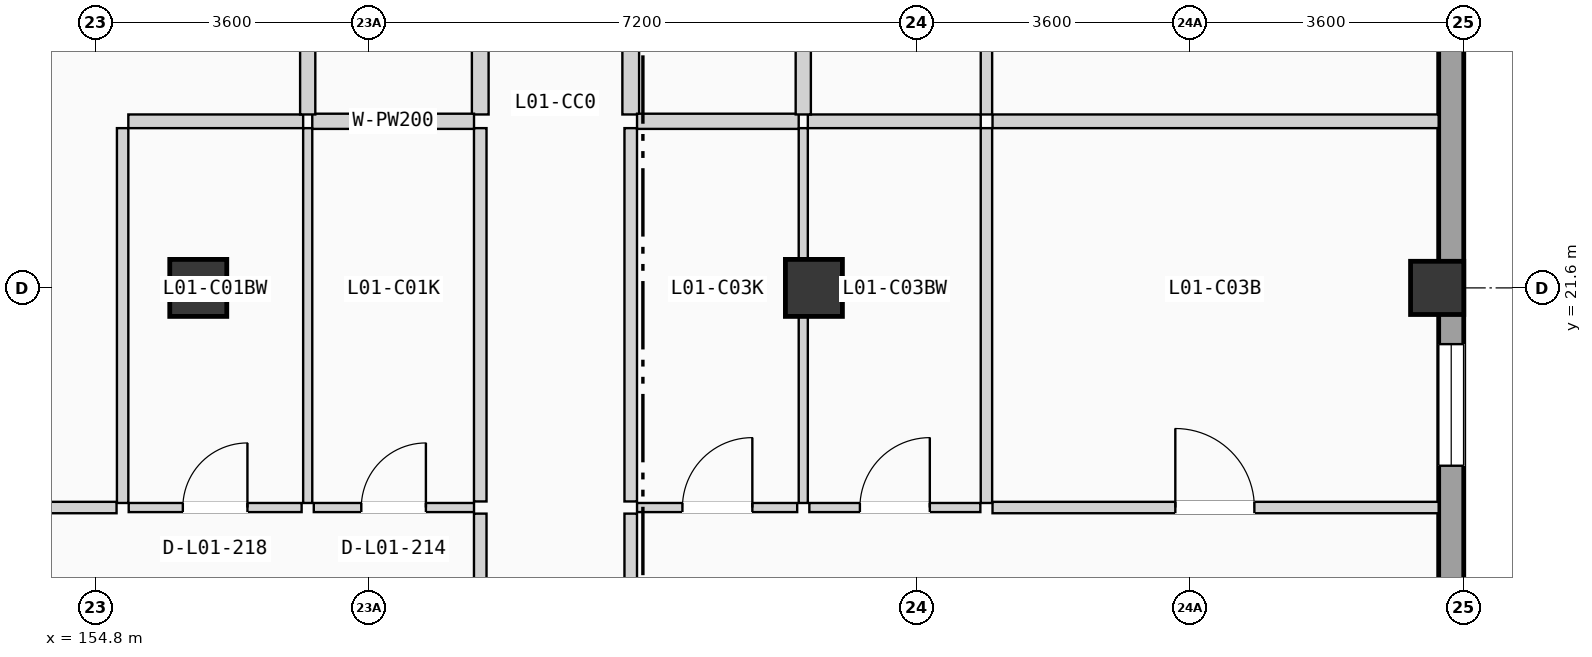
"""IFC4 building model, lengths in metres.
Left out: names, types, materials, properties, quantities, classifications, styles, units other than length and angle.
Written with IfcOpenShell. Run it as: python <this file> out.ifc"""

import sys

from ifc_helpers import new_model, si_unit, direction, frame, frame_2d, origin, origin_2d, place, context, subcontext, project, spatial, rectangle, extrude, element, fill, save


model = new_model("IFC4")
c1 = context("Model", 3, precision=1e-05, world=origin(), true_north=direction((0.0, 1.0)))
c2 = subcontext(c1, "Body", "Model", "MODEL_VIEW")
j1 = project(units=[si_unit("LENGTHUNIT", "METRE"), si_unit("PLANEANGLEUNIT", "RADIAN")], contexts=[c1])
p1 = place(None, origin())
s1 = spatial("IfcSite", under=j1, at=p1, CompositionType="ELEMENT")
p2 = place(p1, origin())
s2 = spatial("IfcBuilding", under=s1, at=p2, CompositionType="ELEMENT")
p3 = place(p2, frame((0.0, 0.0, 4.9)))
s3 = spatial("IfcBuildingStorey", under=s2, at=p3, CompositionType="ELEMENT", Elevation=4.9)
for number, where, z_axis, x_axis in (
    (1, (156.15, 21.6, 0.0), (0.0, 0.0, 1.0), (1.0, 0.0, 0.0)),
    (2, (164.25, 21.6, 0.0), (0.0, 0.0, 1.0), (1.0, 0.0, 0.0)),
):
    element("IfcColumn", number, at=place(p3, frame(where, z_axis=z_axis, x_axis=x_axis)), inside=s3, PredefinedType="COLUMN", context=c2, shape_type="SweptSolid", body=[
        extrude(rectangle(XDim=0.75, YDim=0.75, at=origin_2d()), origin(), (0.0, 0.0, 1.0), 3.675),
    ])
p4 = place(p3, frame((172.45, 21.6, 0.0), z_axis=(0.0, 0.0, 1.0), x_axis=(1.0, 0.0, 0.0)))
e3 = element("IfcColumn", 3, at=p4, inside=s3, PredefinedType="COLUMN", context=c2, shape_type="SweptSolid", body=[
    extrude(rectangle(XDim=0.7, YDim=0.7, at=origin_2d()), origin(), (0.0, 0.0, 1.0), 3.675),
])
p5 = place(p3, frame((172.635, 0.33, 0.0), z_axis=(0.0, 0.0, 1.0), x_axis=(0.0, 1.0, 0.0)))
e4 = element("IfcWall", 4, at=p5, inside=s3, PredefinedType="SOLIDWALL", context=c2, shape_type="SweptSolid", body=[
    extrude(rectangle(XDim=49.74, YDim=0.33, at=frame_2d((24.87, 0.0))), origin(), (0.0, 0.0, 1.0), 3.415),
])
p6 = place(p5, frame((15.58, 0.0, 0.9)))
e5 = element("IfcOpeningElement", 5, at=p6, cuts=e4, PredefinedType="OPENING", context=c2, shape_type="SweptSolid", body=[
    extrude(rectangle(XDim=1.48, YDim=1.65, at=frame_2d((0.74, 0.825))), frame((0.0, 0.175, 0.0), z_axis=(0.0, -1.0, 0.0), x_axis=(1.0, 0.0, 0.0)), (0.0, 0.0, 1.0), 0.35),
])
p7 = place(p5, frame((8.986, 0.0, 0.9)))
e6 = element("IfcOpeningElement", 6, at=p7, cuts=e4, PredefinedType="OPENING", context=c2, shape_type="SweptSolid", body=[
    extrude(rectangle(XDim=1.48, YDim=1.8, at=frame_2d((0.74, 0.9))), frame((0.0, 0.175, 0.0), z_axis=(0.0, -1.0, 0.0), x_axis=(1.0, 0.0, 0.0)), (0.0, 0.0, 1.0), 0.35),
])
p8 = place(p5, frame((18.93, 0.0, 0.9)))
e7 = element("IfcOpeningElement", 7, at=p8, cuts=e4, PredefinedType="OPENING", context=c2, shape_type="SweptSolid", body=[
    extrude(rectangle(XDim=1.6, YDim=1.2, at=frame_2d((0.8, 0.6))), frame((0.0, 0.175, 0.0), z_axis=(0.0, -1.0, 0.0), x_axis=(1.0, 0.0, 0.0)), (0.0, 0.0, 1.0), 0.35),
])
p9 = place(p5, frame((31.648, 0.0, 0.9)))
e8 = element("IfcOpeningElement", 8, at=p9, cuts=e4, PredefinedType="OPENING", context=c2, shape_type="SweptSolid", body=[
    extrude(rectangle(XDim=1.6, YDim=1.35, at=frame_2d((0.8, 0.675))), frame((0.0, 0.175, 0.0), z_axis=(0.0, -1.0, 0.0), x_axis=(1.0, 0.0, 0.0)), (0.0, 0.0, 1.0), 0.35),
])
p10 = place(p5, frame((25.076, 0.0, 0.9)))
e9 = element("IfcOpeningElement", 9, at=p10, cuts=e4, PredefinedType="OPENING", context=c2, shape_type="SweptSolid", body=[
    extrude(rectangle(XDim=1.6, YDim=1.5, at=frame_2d((0.8, 0.75))), frame((0.0, 0.175, 0.0), z_axis=(0.0, -1.0, 0.0), x_axis=(1.0, 0.0, 0.0)), (0.0, 0.0, 1.0), 0.35),
])
p11 = place(p5, frame((38.778, 0.0, 0.9)))
e10 = element("IfcOpeningElement", 10, at=p11, cuts=e4, PredefinedType="OPENING", context=c2, shape_type="SweptSolid", body=[
    extrude(rectangle(XDim=1.6, YDim=1.65, at=frame_2d((0.8, 0.825))), frame((0.0, 0.175, 0.0), z_axis=(0.0, -1.0, 0.0), x_axis=(1.0, 0.0, 0.0)), (0.0, 0.0, 1.0), 0.35),
])
p12 = place(p3, frame((159.86, 12.672, 0.0), z_axis=(0.0, 0.0, 1.0), x_axis=(0.0, 1.0, 0.0)))
e11 = element("IfcWall", 11, at=p12, inside=s3, PredefinedType="PARTITIONING", context=c2, shape_type="SweptSolid", body=[
    extrude(rectangle(XDim=5.958, YDim=0.165, at=frame_2d((2.979, 0.0))), origin(), (0.0, 0.0, 1.0), 3.395),
])
p13 = place(p12, frame((2.454, 0.0, 0.0)))
e12 = element("IfcOpeningElement", 12, at=p13, cuts=e11, PredefinedType="OPENING", context=c2, shape_type="SweptSolid", body=[
    extrude(rectangle(XDim=1.05, YDim=2.13, at=frame_2d((0.525, 1.065))), frame((0.0, 0.093, 0.0), z_axis=(0.0, -1.0, 0.0), x_axis=(1.0, 0.0, 0.0)), (0.0, 0.0, 1.0), 0.185),
])
p14 = place(p3, frame((159.86, 18.79, 0.0), z_axis=(0.0, 0.0, 1.0), x_axis=(0.0, 1.0, 0.0)))
e13 = element("IfcWall", 13, at=p14, inside=s3, PredefinedType="PARTITIONING", context=c2, shape_type="SweptSolid", body=[
    extrude(rectangle(XDim=4.912, YDim=0.165, at=frame_2d((2.456, 0.0))), origin(), (0.0, 0.0, 1.0), 3.395),
])
p15 = place(p3, frame((159.86, 23.882, 0.0), z_axis=(0.0, 0.0, 1.0), x_axis=(0.0, 1.0, 0.0)))
e14 = element("IfcWall", 14, at=p15, inside=s3, PredefinedType="PLUMBINGWALL", context=c2, shape_type="SweptSolid", body=[
    extrude(rectangle(XDim=5.83, YDim=0.22, at=frame_2d((2.915, 0.0))), origin(), (0.0, 0.0, 1.0), 3.395),
])
p16 = place(p3, frame((161.84, 12.672, 0.0), z_axis=(0.0, 0.0, 1.0), x_axis=(0.0, 1.0, 0.0)))
e15 = element("IfcWall", 15, at=p16, inside=s3, PredefinedType="PARTITIONING", context=c2, shape_type="SweptSolid", body=[
    extrude(rectangle(XDim=5.958, YDim=0.165, at=frame_2d((2.979, 0.0))), origin(), (0.0, 0.0, 1.0), 3.395),
])
p17 = place(p16, frame((2.454, 0.0, 0.0)))
e16 = element("IfcOpeningElement", 16, at=p17, cuts=e15, PredefinedType="OPENING", context=c2, shape_type="SweptSolid", body=[
    extrude(rectangle(XDim=1.05, YDim=2.13, at=frame_2d((0.525, 1.065))), frame((0.0, 0.093, 0.0), z_axis=(0.0, -1.0, 0.0), x_axis=(1.0, 0.0, 0.0)), (0.0, 0.0, 1.0), 0.185),
])
p18 = place(p3, frame((161.84, 18.79, 0.0), z_axis=(0.0, 0.0, 1.0), x_axis=(0.0, 1.0, 0.0)))
e17 = element("IfcWall", 17, at=p18, inside=s3, PredefinedType="PARTITIONING", context=c2, shape_type="SweptSolid", body=[
    extrude(rectangle(XDim=4.912, YDim=0.165, at=frame_2d((2.456, 0.0))), origin(), (0.0, 0.0, 1.0), 3.395),
])
p19 = place(p3, frame((161.84, 23.882, 0.0), z_axis=(0.0, 0.0, 1.0), x_axis=(0.0, 1.0, 0.0)))
e18 = element("IfcWall", 18, at=p19, inside=s3, PredefinedType="PLUMBINGWALL", context=c2, shape_type="SweptSolid", body=[
    extrude(rectangle(XDim=5.785, YDim=0.22, at=frame_2d((2.893, 0.0))), origin(), (0.0, 0.0, 1.0), 3.395),
])
p20 = place(p3, frame((157.67, 18.71, 0.0), z_axis=(0.0, 0.0, 1.0), x_axis=(1.0, 0.0, 0.0)))
e19 = element("IfcWall", 19, at=p20, inside=s3, PredefinedType="PARTITIONING", context=c2, shape_type="SweptSolid", body=[
    extrude(rectangle(XDim=2.108, YDim=0.12, at=frame_2d((1.054, 0.0))), origin(), (0.0, 0.0, 1.0), 3.395),
])
p21 = place(p20, frame((0.625, 0.0, 0.0)))
e20 = element("IfcOpeningElement", 20, at=p21, cuts=e19, PredefinedType="OPENING", context=c2, shape_type="SweptSolid", body=[
    extrude(rectangle(XDim=0.85, YDim=2.01, at=frame_2d((0.425, 1.005))), frame((0.0, 0.07, 0.0), z_axis=(0.0, -1.0, 0.0), x_axis=(1.0, 0.0, 0.0)), (0.0, 0.0, 1.0), 0.14),
])
p22 = place(p3, frame((147.93, 18.71, 0.0), z_axis=(0.0, 0.0, 1.0), x_axis=(1.0, 0.0, 0.0)))
e21 = element("IfcWall", 21, at=p22, inside=s3, PredefinedType="PARTITIONING", context=c2, shape_type="SweptSolid", body=[
    extrude(rectangle(XDim=7.145, YDim=0.15, at=frame_2d((3.573, 0.0))), origin(), (0.0, 0.0, 1.0), 3.395),
])
p23 = place(p22, frame((3.132, 0.0, 0.0)))
e22 = element("IfcOpeningElement", 22, at=p23, cuts=e21, PredefinedType="OPENING", context=c2, shape_type="SweptSolid", body=[
    extrude(rectangle(XDim=0.9, YDim=2.04, at=frame_2d((0.45, 1.02))), frame((0.0, 0.085, 0.0), z_axis=(0.0, -1.0, 0.0), x_axis=(1.0, 0.0, 0.0)), (0.0, 0.0, 1.0), 0.17),
])
p24 = place(p3, frame((155.235, 18.71, 0.0), z_axis=(0.0, 0.0, 1.0), x_axis=(1.0, 0.0, 0.0)))
e23 = element("IfcWall", 23, at=p24, inside=s3, PredefinedType="PARTITIONING", context=c2, shape_type="SweptSolid", body=[
    extrude(rectangle(XDim=2.275, YDim=0.12, at=frame_2d((1.137, 0.0))), origin(), (0.0, 0.0, 1.0), 3.395),
])
p25 = place(p24, frame((0.712, 0.0, 0.0)))
e24 = element("IfcOpeningElement", 24, at=p25, cuts=e23, PredefinedType="OPENING", context=c2, shape_type="SweptSolid", body=[
    extrude(rectangle(XDim=0.85, YDim=2.01, at=frame_2d((0.425, 1.005))), frame((0.0, 0.07, 0.0), z_axis=(0.0, -1.0, 0.0), x_axis=(1.0, 0.0, 0.0)), (0.0, 0.0, 1.0), 0.14),
])
p26 = place(p3, frame((157.59, 18.77, 0.0), z_axis=(0.0, 0.0, 1.0), x_axis=(0.0, 1.0, 0.0)))
e25 = element("IfcWall", 25, at=p26, inside=s3, PredefinedType="PARTITIONING", context=c2, shape_type="SweptSolid", body=[
    extrude(rectangle(XDim=4.932, YDim=0.12, at=frame_2d((2.466, 0.0))), origin(), (0.0, 0.0, 1.0), 3.395),
])
p27 = place(p3, frame((157.65, 23.792, 0.0), z_axis=(0.0, 0.0, 1.0), x_axis=(1.0, 0.0, 0.0)))
e26 = element("IfcWall", 26, at=p27, inside=s3, PredefinedType="PLUMBINGWALL", context=c2, shape_type="SweptSolid", body=[
    extrude(rectangle(XDim=2.128, YDim=0.2, at=frame_2d((1.064, 0.0))), origin(), (0.0, 0.0, 1.0), 3.395),
])
p28 = place(p3, frame((155.155, 18.77, 0.0), z_axis=(0.0, 0.0, 1.0), x_axis=(0.0, 1.0, 0.0)))
e27 = element("IfcWall", 27, at=p28, inside=s3, PredefinedType="PARTITIONING", context=c2, shape_type="SweptSolid", body=[
    extrude(rectangle(XDim=4.932, YDim=0.15, at=frame_2d((2.466, 0.0))), origin(), (0.0, 0.0, 1.0), 3.395),
])
p29 = place(p3, frame((155.23, 23.792, 0.0), z_axis=(0.0, 0.0, 1.0), x_axis=(1.0, 0.0, 0.0)))
e28 = element("IfcWall", 28, at=p29, inside=s3, PredefinedType="PARTITIONING", context=c2, shape_type="SweptSolid", body=[
    extrude(rectangle(XDim=2.3, YDim=0.18, at=frame_2d((1.15, 0.0))), origin(), (0.0, 0.0, 1.0), 3.395),
])
p30 = place(p3, frame((157.59, 23.882, 0.0), z_axis=(0.0, 0.0, 1.0), x_axis=(0.0, 1.0, 0.0)))
e29 = element("IfcWall", 29, at=p30, inside=s3, PredefinedType="PLUMBINGWALL", context=c2, shape_type="SweptSolid", body=[
    extrude(rectangle(XDim=5.85, YDim=0.2, at=frame_2d((2.925, 0.0))), origin(), (0.0, 0.0, 1.0), 3.395),
])
p31 = place(p30, frame((2.49, 0.0, 0.0)))
e30 = element("IfcOpeningElement", 30, at=p31, cuts=e29, PredefinedType="OPENING", context=c2, shape_type="SweptSolid", body=[
    extrude(rectangle(XDim=0.85, YDim=2.01, at=frame_2d((0.425, 1.005))), frame((0.0, 0.11, 0.0), z_axis=(0.0, -1.0, 0.0), x_axis=(1.0, 0.0, 0.0)), (0.0, 0.0, 1.0), 0.22),
])
p32 = place(p3, frame((161.923, 18.71, 0.0), z_axis=(0.0, 0.0, 1.0), x_axis=(1.0, 0.0, 0.0)))
e31 = element("IfcWall", 31, at=p32, inside=s3, PredefinedType="PARTITIONING", context=c2, shape_type="SweptSolid", body=[
    extrude(rectangle(XDim=2.107, YDim=0.12, at=frame_2d((1.053, 0.0))), origin(), (0.0, 0.0, 1.0), 3.395),
])
p33 = place(p32, frame((0.597, 0.0, 0.0)))
e32 = element("IfcOpeningElement", 32, at=p33, cuts=e31, PredefinedType="OPENING", context=c2, shape_type="SweptSolid", body=[
    extrude(rectangle(XDim=0.92, YDim=2.02, at=frame_2d((0.46, 1.01))), frame((0.0, 0.07, 0.0), z_axis=(0.0, -1.0, 0.0), x_axis=(1.0, 0.0, 0.0)), (0.0, 0.0, 1.0), 0.14),
])
p34 = place(p3, frame((166.6, 18.71, 0.0), z_axis=(0.0, 0.0, 1.0), x_axis=(1.0, 0.0, 0.0)))
e33 = element("IfcWall", 33, at=p34, inside=s3, PredefinedType="PARTITIONING", context=c2, shape_type="SweptSolid", body=[
    extrude(rectangle(XDim=5.87, YDim=0.15, at=frame_2d((2.935, 0.0))), origin(), (0.0, 0.0, 1.0), 3.395),
])
p35 = place(p34, frame((2.405, 0.0, 0.0)))
e34 = element("IfcOpeningElement", 34, at=p35, cuts=e33, PredefinedType="OPENING", context=c2, shape_type="SweptSolid", body=[
    extrude(rectangle(XDim=1.04, YDim=2.08, at=frame_2d((0.52, 1.04))), frame((0.0, 0.085, 0.0), z_axis=(0.0, -1.0, 0.0), x_axis=(1.0, 0.0, 0.0)), (0.0, 0.0, 1.0), 0.17),
])
p36 = place(p3, frame((164.19, 18.71, 0.0), z_axis=(0.0, 0.0, 1.0), x_axis=(1.0, 0.0, 0.0)))
e35 = element("IfcWall", 35, at=p36, inside=s3, PredefinedType="PARTITIONING", context=c2, shape_type="SweptSolid", body=[
    extrude(rectangle(XDim=2.25, YDim=0.12, at=frame_2d((1.125, 0.0))), origin(), (0.0, 0.0, 1.0), 3.395),
])
p37 = place(p36, frame((0.665, 0.0, 0.0)))
e36 = element("IfcOpeningElement", 36, at=p37, cuts=e35, PredefinedType="OPENING", context=c2, shape_type="SweptSolid", body=[
    extrude(rectangle(XDim=0.92, YDim=2.02, at=frame_2d((0.46, 1.01))), frame((0.0, 0.07, 0.0), z_axis=(0.0, -1.0, 0.0), x_axis=(1.0, 0.0, 0.0)), (0.0, 0.0, 1.0), 0.14),
])
p38 = place(p3, frame((164.11, 18.77, 0.0), z_axis=(0.0, 0.0, 1.0), x_axis=(0.0, 1.0, 0.0)))
e37 = element("IfcWall", 37, at=p38, inside=s3, PredefinedType="PARTITIONING", context=c2, shape_type="SweptSolid", body=[
    extrude(rectangle(XDim=4.932, YDim=0.12, at=frame_2d((2.466, 0.0))), origin(), (0.0, 0.0, 1.0), 3.395),
])
p39 = place(p3, frame((161.923, 23.792, 0.0), z_axis=(0.0, 0.0, 1.0), x_axis=(1.0, 0.0, 0.0)))
e38 = element("IfcWall", 38, at=p39, inside=s3, PredefinedType="PLUMBINGWALL", context=c2, shape_type="SweptSolid", body=[
    extrude(rectangle(XDim=2.127, YDim=0.2, at=frame_2d((1.063, 0.0))), origin(), (0.0, 0.0, 1.0), 3.395),
])
p40 = place(p3, frame((166.52, 18.77, 0.0), z_axis=(0.0, 0.0, 1.0), x_axis=(0.0, 1.0, 0.0)))
e39 = element("IfcWall", 39, at=p40, inside=s3, PredefinedType="PARTITIONING", context=c2, shape_type="SweptSolid", body=[
    extrude(rectangle(XDim=4.932, YDim=0.15, at=frame_2d((2.466, 0.0))), origin(), (0.0, 0.0, 1.0), 3.395),
])
p41 = place(p3, frame((166.6, 23.792, 0.0), z_axis=(0.0, 0.0, 1.0), x_axis=(1.0, 0.0, 0.0)))
e40 = element("IfcWall", 40, at=p41, inside=s3, PredefinedType="PARTITIONING", context=c2, shape_type="SweptSolid", body=[
    extrude(rectangle(XDim=5.87, YDim=0.18, at=frame_2d((2.935, 0.0))), origin(), (0.0, 0.0, 1.0), 3.395),
])
p42 = place(p3, frame((164.17, 23.792, 0.0), z_axis=(0.0, 0.0, 1.0), x_axis=(1.0, 0.0, 0.0)))
e41 = element("IfcWall", 41, at=p42, inside=s3, PredefinedType="PARTITIONING", context=c2, shape_type="SweptSolid", body=[
    extrude(rectangle(XDim=2.275, YDim=0.18, at=frame_2d((1.138, 0.0))), origin(), (0.0, 0.0, 1.0), 3.395),
])
p43 = place(p3, frame((164.11, 23.882, 0.0), z_axis=(0.0, 0.0, 1.0), x_axis=(0.0, 1.0, 0.0)))
e42 = element("IfcWall", 42, at=p43, inside=s3, PredefinedType="PLUMBINGWALL", context=c2, shape_type="SweptSolid", body=[
    extrude(rectangle(XDim=5.805, YDim=0.2, at=frame_2d((2.902, 0.0))), origin(), (0.0, 0.0, 1.0), 3.395),
])
p44 = place(p43, frame((2.468, 0.0, 0.0)))
e43 = element("IfcOpeningElement", 43, at=p44, cuts=e42, PredefinedType="OPENING", context=c2, shape_type="SweptSolid", body=[
    extrude(rectangle(XDim=0.85, YDim=2.01, at=frame_2d((0.425, 1.005))), frame((0.0, 0.11, 0.0), z_axis=(0.0, -1.0, 0.0), x_axis=(1.0, 0.0, 0.0)), (0.0, 0.0, 1.0), 0.22),
])
p45 = place(p3, frame((166.52, 23.882, 0.0), z_axis=(0.0, 0.0, 1.0), x_axis=(0.0, 1.0, 0.0)))
e44 = element("IfcWall", 44, at=p45, inside=s3, PredefinedType="PARTITIONING", context=c2, shape_type="SweptSolid", body=[
    extrude(rectangle(XDim=5.805, YDim=0.15, at=frame_2d((2.902, 0.0))), origin(), (0.0, 0.0, 1.0), 3.395),
])
p46 = place(p8, origin())
e45 = element("IfcWindow", 45, at=p46, inside=s3, PartitioningType="DOUBLE_PANEL_VERTICAL", PredefinedType="WINDOW", context=c2, shape_type="SweptSolid", body=[
    extrude(rectangle(XDim=1.6, YDim=1.2, at=frame_2d((0.8, 0.6))), frame((0.0, 0.03, 0.0), z_axis=(0.0, -1.0, 0.0), x_axis=(1.0, 0.0, 0.0)), (0.0, 0.0, 1.0), 0.06),
])
fill(e7, e45)
p47 = place(p21, origin())
e46 = element("IfcDoor", 46, at=p47, inside=s3, OperationType="SINGLE_SWING_RIGHT", PredefinedType="DOOR", context=c2, shape_type="SweptSolid", body=[
    extrude(rectangle(XDim=0.85, YDim=2.01, at=frame_2d((0.425, 1.005))), frame((0.0, 0.025, 0.0), z_axis=(0.0, -1.0, 0.0), x_axis=(1.0, 0.0, 0.0)), (0.0, 0.0, 1.0), 0.05),
])
fill(e20, e46)
p48 = place(p25, origin())
e47 = element("IfcDoor", 47, at=p48, inside=s3, OperationType="SINGLE_SWING_RIGHT", PredefinedType="DOOR", context=c2, shape_type="SweptSolid", body=[
    extrude(rectangle(XDim=0.85, YDim=2.01, at=frame_2d((0.425, 1.005))), frame((0.0, 0.025, 0.0), z_axis=(0.0, -1.0, 0.0), x_axis=(1.0, 0.0, 0.0)), (0.0, 0.0, 1.0), 0.05),
])
fill(e24, e47)
p49 = place(p33, origin())
e48 = element("IfcDoor", 48, at=p49, inside=s3, OperationType="SINGLE_SWING_RIGHT", PredefinedType="DOOR", context=c2, shape_type="SweptSolid", body=[
    extrude(rectangle(XDim=0.92, YDim=2.02, at=frame_2d((0.46, 1.01))), frame((0.0, 0.025, 0.0), z_axis=(0.0, -1.0, 0.0), x_axis=(1.0, 0.0, 0.0)), (0.0, 0.0, 1.0), 0.05),
])
fill(e32, e48)
p50 = place(p35, origin())
e49 = element("IfcDoor", 49, at=p50, inside=s3, OperationType="SINGLE_SWING_LEFT", PredefinedType="DOOR", context=c2, shape_type="SweptSolid", body=[
    extrude(rectangle(XDim=1.04, YDim=2.08, at=frame_2d((0.52, 1.04))), frame((0.0, 0.025, 0.0), z_axis=(0.0, -1.0, 0.0), x_axis=(1.0, 0.0, 0.0)), (0.0, 0.0, 1.0), 0.05),
])
fill(e34, e49)
p51 = place(p37, origin())
e50 = element("IfcDoor", 50, at=p51, inside=s3, OperationType="SINGLE_SWING_RIGHT", PredefinedType="DOOR", context=c2, shape_type="SweptSolid", body=[
    extrude(rectangle(XDim=0.92, YDim=2.02, at=frame_2d((0.46, 1.01))), frame((0.0, 0.025, 0.0), z_axis=(0.0, -1.0, 0.0), x_axis=(1.0, 0.0, 0.0)), (0.0, 0.0, 1.0), 0.05),
])
fill(e36, e50)
save(model, sys.argv[1])
